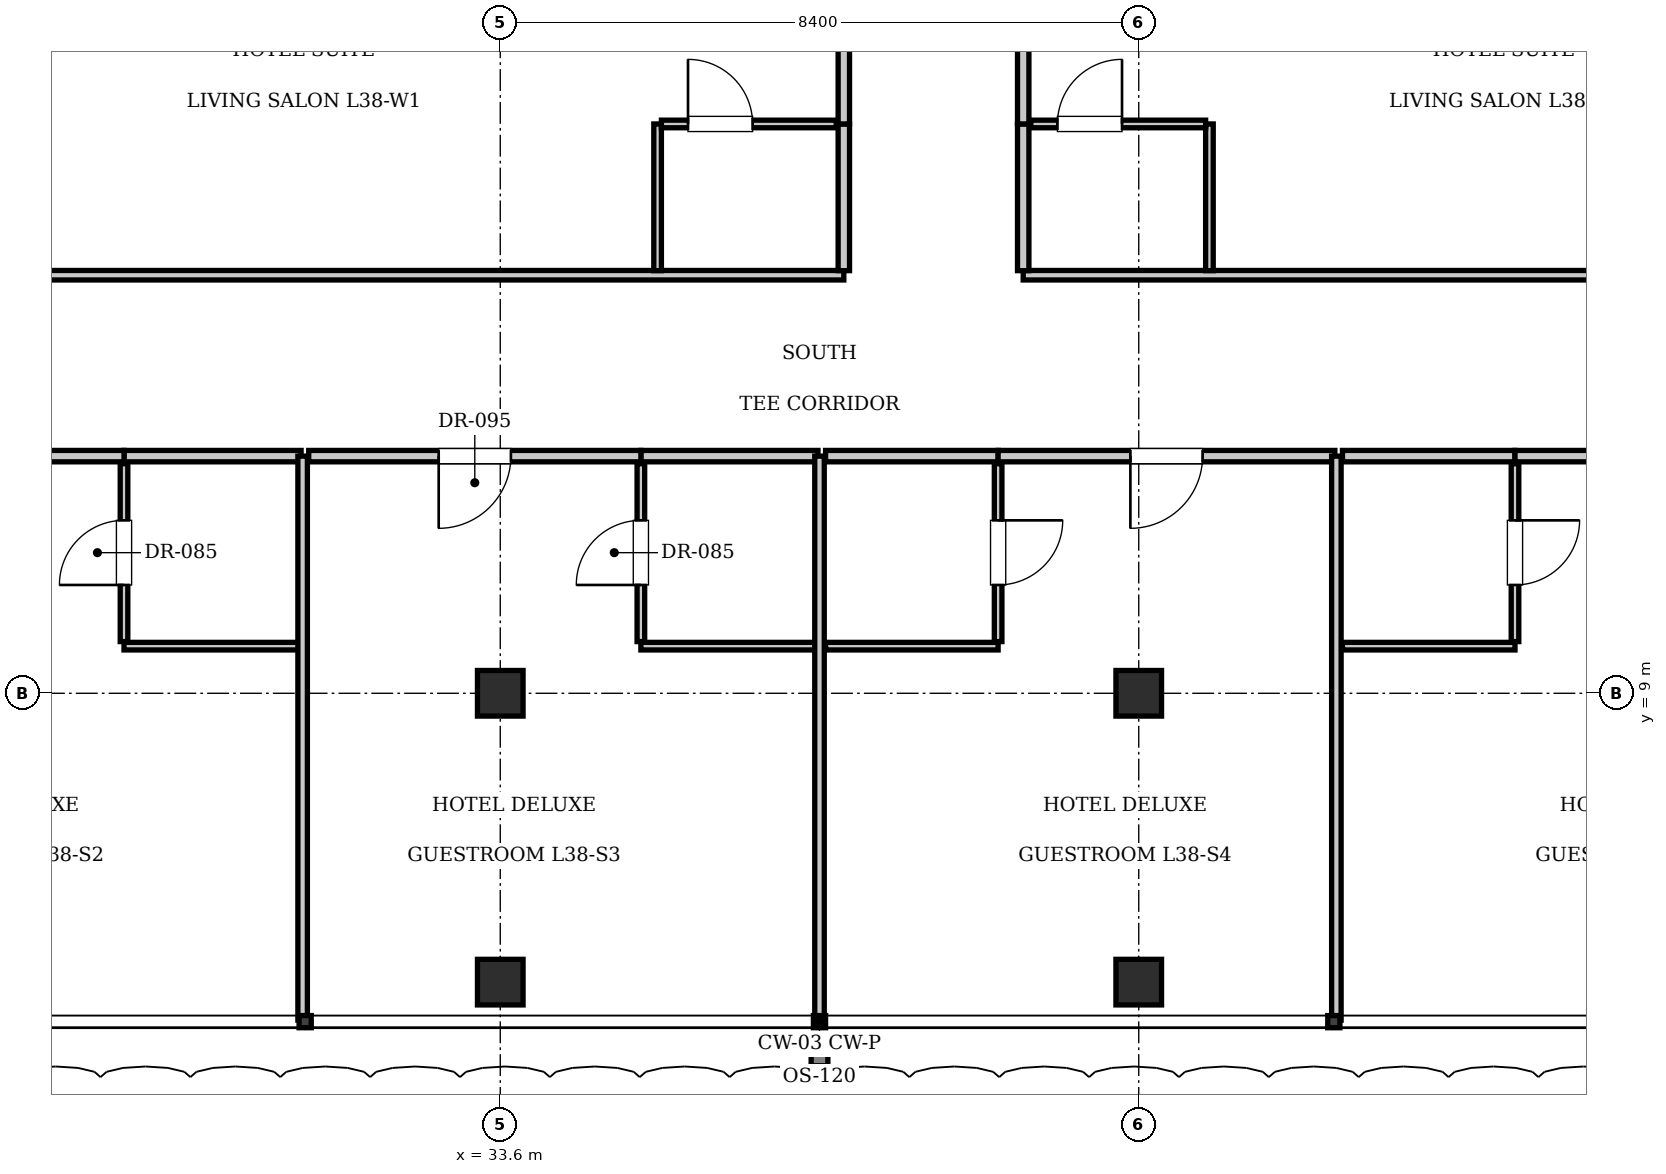
"""IFC4 building model, lengths in metres.
Left out: names, types, materials, properties, quantities, classifications, styles, units other than length and angle.
Written with IfcOpenShell. Run it as: python <this file> out.ifc"""

import sys

from ifc_helpers import new_model, si_unit, direction, frame, frame_2d, origin, origin_2d, place, context, subcontext, project, spatial, rectangle, i_section, extrude, element, fill, save


model = new_model("IFC4")
c1 = context("Model", 3, precision=1e-05, world=origin(), true_north=direction((0.0, 1.0)))
c2 = subcontext(c1, "Body", "Model", "MODEL_VIEW")
j1 = project(units=[si_unit("LENGTHUNIT", "METRE"), si_unit("PLANEANGLEUNIT", "RADIAN")], contexts=[c1])
p1 = place(None, origin())
s1 = spatial("IfcSite", under=j1, at=p1, CompositionType="ELEMENT")
p2 = place(p1, origin())
s2 = spatial("IfcBuilding", under=s1, at=p2, CompositionType="ELEMENT")
p3 = place(p2, frame((0.0, 0.0, 158.2)))
s3 = spatial("IfcBuildingStorey", under=s2, at=p3, CompositionType="ELEMENT", Elevation=158.2)
for number, where, z_axis, x_axis in (
    (1, (33.6, 9.0, 0.0), (0.0, 0.0, 1.0), (1.0, 0.0, 0.0)),
    (2, (42.0, 9.0, 0.0), (0.0, 0.0, 1.0), (1.0, 0.0, 0.0)),
    (3, (33.6, 5.2, 0.0), (0.0, 0.0, 1.0), (1.0, 0.0, 0.0)),
    (4, (42.0, 5.2, 0.0), (0.0, 0.0, 1.0), (1.0, 0.0, 0.0)),
):
    element("IfcColumn", number, at=place(p3, frame(where, z_axis=z_axis, x_axis=x_axis)), inside=s3, PredefinedType="COLUMN", context=c2, shape_type="SweptSolid", body=[
        extrude(i_section(OverallWidth=0.6, OverallDepth=0.6, WebThickness=0.025, FlangeThickness=0.038, at=origin_2d()), origin(), (0.0, 0.0, 1.0), 3.85),
    ])
p4 = place(p3, frame((28.65, 12.12, 0.0), z_axis=(0.0, 0.0, 1.0), x_axis=(1.0, 0.0, 0.0)))
e5 = element("IfcWall", 5, at=p4, inside=s3, PredefinedType="PARTITIONING", context=c2, shape_type="SweptSolid", body=[
    extrude(rectangle(XDim=2.33, YDim=0.15, at=frame_2d((1.165, 0.0))), origin(), (0.0, 0.0, 1.0), 3.61),
])
p5 = place(p3, frame((28.65, 9.62, 0.0), z_axis=(0.0, 0.0, 1.0), x_axis=(1.0, 0.0, 0.0)))
e6 = element("IfcWall", 6, at=p5, inside=s3, PredefinedType="PARTITIONING", context=c2, shape_type="SweptSolid", body=[
    extrude(rectangle(XDim=2.31, YDim=0.1, at=frame_2d((1.155, 0.0))), origin(), (0.0, 0.0, 1.0), 3.61),
])
p6 = place(p3, frame((28.65, 9.68, 0.0), z_axis=(0.0, 0.0, 1.0), x_axis=(0.0, 1.0, 0.0)))
e7 = element("IfcWall", 7, at=p6, inside=s3, PredefinedType="PARTITIONING", context=c2, shape_type="SweptSolid", body=[
    extrude(rectangle(XDim=2.34, YDim=0.1, at=frame_2d((1.17, 0.0))), origin(), (0.0, 0.0, 1.0), 3.61),
])
p7 = place(p6, frame((0.745, 0.0, 0.0)))
e8 = element("IfcOpeningElement", 8, at=p7, cuts=e7, PredefinedType="OPENING", context=c2, shape_type="SweptSolid", body=[
    extrude(rectangle(XDim=0.85, YDim=2.1, at=frame_2d((0.425, 1.05))), frame((0.0, 0.06, 0.0), z_axis=(0.0, -1.0, 0.0), x_axis=(1.0, 0.0, 0.0)), (0.0, 0.0, 1.0), 0.12),
])
p8 = place(p3, frame((24.28, 12.12, 0.0), z_axis=(0.0, 0.0, 1.0), x_axis=(1.0, 0.0, 0.0)))
e9 = element("IfcWall", 9, at=p8, inside=s3, PredefinedType="PARTITIONING", context=c2, shape_type="SweptSolid", body=[
    extrude(rectangle(XDim=4.37, YDim=0.15, at=frame_2d((2.185, 0.0))), origin(), (0.0, 0.0, 1.0), 3.61),
])
p9 = place(p8, frame((1.71, 0.0, 0.0)))
e10 = element("IfcOpeningElement", 10, at=p9, cuts=e9, PredefinedType="OPENING", context=c2, shape_type="SweptSolid", body=[
    extrude(rectangle(XDim=0.95, YDim=2.15, at=frame_2d((0.475, 1.075))), frame((0.0, 0.085, 0.0), z_axis=(0.0, -1.0, 0.0), x_axis=(1.0, 0.0, 0.0)), (0.0, 0.0, 1.0), 0.17),
])
p10 = place(p3, frame((31.0, 4.7, 0.0), z_axis=(0.0, 0.0, 1.0), x_axis=(0.0, 1.0, 0.0)))
e11 = element("IfcWall", 11, at=p10, inside=s3, PredefinedType="PARTITIONING", context=c2, shape_type="SweptSolid", body=[
    extrude(rectangle(XDim=7.42, YDim=0.125, at=frame_2d((3.71, 0.0))), origin(), (0.0, 0.0, 1.0), 3.61),
])
p11 = place(p3, frame((35.45, 12.12, 0.0), z_axis=(0.0, 0.0, 1.0), x_axis=(1.0, 0.0, 0.0)))
e12 = element("IfcWall", 12, at=p11, inside=s3, PredefinedType="PARTITIONING", context=c2, shape_type="SweptSolid", body=[
    extrude(rectangle(XDim=2.33, YDim=0.15, at=frame_2d((1.165, 0.0))), origin(), (0.0, 0.0, 1.0), 3.61),
])
p12 = place(p3, frame((35.45, 9.62, 0.0), z_axis=(0.0, 0.0, 1.0), x_axis=(1.0, 0.0, 0.0)))
e13 = element("IfcWall", 13, at=p12, inside=s3, PredefinedType="PARTITIONING", context=c2, shape_type="SweptSolid", body=[
    extrude(rectangle(XDim=2.31, YDim=0.1, at=frame_2d((1.155, 0.0))), origin(), (0.0, 0.0, 1.0), 3.61),
])
p13 = place(p3, frame((35.45, 9.68, 0.0), z_axis=(0.0, 0.0, 1.0), x_axis=(0.0, 1.0, 0.0)))
e14 = element("IfcWall", 14, at=p13, inside=s3, PredefinedType="PARTITIONING", context=c2, shape_type="SweptSolid", body=[
    extrude(rectangle(XDim=2.34, YDim=0.1, at=frame_2d((1.17, 0.0))), origin(), (0.0, 0.0, 1.0), 3.61),
])
p14 = place(p13, frame((0.745, 0.0, 0.0)))
e15 = element("IfcOpeningElement", 15, at=p14, cuts=e14, PredefinedType="OPENING", context=c2, shape_type="SweptSolid", body=[
    extrude(rectangle(XDim=0.85, YDim=2.1, at=frame_2d((0.425, 1.05))), frame((0.0, 0.06, 0.0), z_axis=(0.0, -1.0, 0.0), x_axis=(1.0, 0.0, 0.0)), (0.0, 0.0, 1.0), 0.12),
])
p15 = place(p3, frame((31.08, 12.12, 0.0), z_axis=(0.0, 0.0, 1.0), x_axis=(1.0, 0.0, 0.0)))
e16 = element("IfcWall", 16, at=p15, inside=s3, PredefinedType="PARTITIONING", context=c2, shape_type="SweptSolid", body=[
    extrude(rectangle(XDim=4.37, YDim=0.15, at=frame_2d((2.185, 0.0))), origin(), (0.0, 0.0, 1.0), 3.61),
])
p16 = place(p15, frame((1.71, 0.0, 0.0)))
e17 = element("IfcOpeningElement", 17, at=p16, cuts=e16, PredefinedType="OPENING", context=c2, shape_type="SweptSolid", body=[
    extrude(rectangle(XDim=0.95, YDim=2.15, at=frame_2d((0.475, 1.075))), frame((0.0, 0.085, 0.0), z_axis=(0.0, -1.0, 0.0), x_axis=(1.0, 0.0, 0.0)), (0.0, 0.0, 1.0), 0.17),
])
p17 = place(p3, frame((37.8, 4.7, 0.0), z_axis=(0.0, 0.0, 1.0), x_axis=(0.0, 1.0, 0.0)))
e18 = element("IfcWall", 18, at=p17, inside=s3, PredefinedType="PARTITIONING", context=c2, shape_type="SweptSolid", body=[
    extrude(rectangle(XDim=7.42, YDim=0.125, at=frame_2d((3.71, 0.0))), origin(), (0.0, 0.0, 1.0), 3.344),
])
p18 = place(p3, frame((37.88, 12.12, 0.0), z_axis=(0.0, 0.0, 1.0), x_axis=(1.0, 0.0, 0.0)))
e19 = element("IfcWall", 19, at=p18, inside=s3, PredefinedType="PARTITIONING", context=c2, shape_type="SweptSolid", body=[
    extrude(rectangle(XDim=2.27, YDim=0.15, at=frame_2d((1.135, 0.0))), origin(), (0.0, 0.0, 1.0), 3.61),
])
p19 = place(p3, frame((37.88, 9.62, 0.0), z_axis=(0.0, 0.0, 1.0), x_axis=(1.0, 0.0, 0.0)))
e20 = element("IfcWall", 20, at=p19, inside=s3, PredefinedType="PARTITIONING", context=c2, shape_type="SweptSolid", body=[
    extrude(rectangle(XDim=2.27, YDim=0.1, at=frame_2d((1.135, 0.0))), origin(), (0.0, 0.0, 1.0), 3.61),
])
p20 = place(p3, frame((40.15, 9.68, 0.0), z_axis=(0.0, 0.0, 1.0), x_axis=(0.0, 1.0, 0.0)))
e21 = element("IfcWall", 21, at=p20, inside=s3, PredefinedType="PARTITIONING", context=c2, shape_type="SweptSolid", body=[
    extrude(rectangle(XDim=2.34, YDim=0.1, at=frame_2d((1.17, 0.0))), origin(), (0.0, 0.0, 1.0), 3.61),
])
p21 = place(p20, frame((0.745, 0.0, 0.0)))
e22 = element("IfcOpeningElement", 22, at=p21, cuts=e21, PredefinedType="OPENING", context=c2, shape_type="SweptSolid", body=[
    extrude(rectangle(XDim=0.85, YDim=2.1, at=frame_2d((0.425, 1.05))), frame((0.0, 0.06, 0.0), z_axis=(0.0, -1.0, 0.0), x_axis=(1.0, 0.0, 0.0)), (0.0, 0.0, 1.0), 0.12),
])
p22 = place(p3, frame((40.15, 12.12, 0.0), z_axis=(0.0, 0.0, 1.0), x_axis=(1.0, 0.0, 0.0)))
e23 = element("IfcWall", 23, at=p22, inside=s3, PredefinedType="PARTITIONING", context=c2, shape_type="SweptSolid", body=[
    extrude(rectangle(XDim=4.43, YDim=0.15, at=frame_2d((2.215, 0.0))), origin(), (0.0, 0.0, 1.0), 3.61),
])
p23 = place(p22, frame((1.74, 0.0, 0.0)))
e24 = element("IfcOpeningElement", 24, at=p23, cuts=e23, PredefinedType="OPENING", context=c2, shape_type="SweptSolid", body=[
    extrude(rectangle(XDim=0.95, YDim=2.15, at=frame_2d((0.475, 1.075))), frame((0.0, 0.085, 0.0), z_axis=(0.0, -1.0, 0.0), x_axis=(1.0, 0.0, 0.0)), (0.0, 0.0, 1.0), 0.17),
])
p24 = place(p3, frame((44.6, 4.7, 0.0), z_axis=(0.0, 0.0, 1.0), x_axis=(0.0, 1.0, 0.0)))
e25 = element("IfcWall", 25, at=p24, inside=s3, PredefinedType="PARTITIONING", context=c2, shape_type="SweptSolid", body=[
    extrude(rectangle(XDim=7.42, YDim=0.125, at=frame_2d((3.71, 0.0))), origin(), (0.0, 0.0, 1.0), 3.61),
])
p25 = place(p3, frame((44.68, 12.12, 0.0), z_axis=(0.0, 0.0, 1.0), x_axis=(1.0, 0.0, 0.0)))
e26 = element("IfcWall", 26, at=p25, inside=s3, PredefinedType="PARTITIONING", context=c2, shape_type="SweptSolid", body=[
    extrude(rectangle(XDim=2.27, YDim=0.15, at=frame_2d((1.135, 0.0))), origin(), (0.0, 0.0, 1.0), 3.61),
])
p26 = place(p3, frame((44.68, 9.62, 0.0), z_axis=(0.0, 0.0, 1.0), x_axis=(1.0, 0.0, 0.0)))
e27 = element("IfcWall", 27, at=p26, inside=s3, PredefinedType="PARTITIONING", context=c2, shape_type="SweptSolid", body=[
    extrude(rectangle(XDim=2.27, YDim=0.1, at=frame_2d((1.135, 0.0))), origin(), (0.0, 0.0, 1.0), 3.61),
])
p27 = place(p3, frame((46.95, 9.68, 0.0), z_axis=(0.0, 0.0, 1.0), x_axis=(0.0, 1.0, 0.0)))
e28 = element("IfcWall", 28, at=p27, inside=s3, PredefinedType="PARTITIONING", context=c2, shape_type="SweptSolid", body=[
    extrude(rectangle(XDim=2.34, YDim=0.1, at=frame_2d((1.17, 0.0))), origin(), (0.0, 0.0, 1.0), 3.61),
])
p28 = place(p27, frame((0.745, 0.0, 0.0)))
e29 = element("IfcOpeningElement", 29, at=p28, cuts=e28, PredefinedType="OPENING", context=c2, shape_type="SweptSolid", body=[
    extrude(rectangle(XDim=0.85, YDim=2.1, at=frame_2d((0.425, 1.05))), frame((0.0, 0.06, 0.0), z_axis=(0.0, -1.0, 0.0), x_axis=(1.0, 0.0, 0.0)), (0.0, 0.0, 1.0), 0.12),
])
p29 = place(p3, frame((46.95, 12.12, 0.0), z_axis=(0.0, 0.0, 1.0), x_axis=(1.0, 0.0, 0.0)))
e30 = element("IfcWall", 30, at=p29, inside=s3, PredefinedType="PARTITIONING", context=c2, shape_type="SweptSolid", body=[
    extrude(rectangle(XDim=4.43, YDim=0.15, at=frame_2d((2.215, 0.0))), origin(), (0.0, 0.0, 1.0), 3.61),
])
p30 = place(p29, frame((1.74, 0.0, 0.0)))
e31 = element("IfcOpeningElement", 31, at=p30, cuts=e30, PredefinedType="OPENING", context=c2, shape_type="SweptSolid", body=[
    extrude(rectangle(XDim=0.95, YDim=2.15, at=frame_2d((0.475, 1.075))), frame((0.0, 0.085, 0.0), z_axis=(0.0, -1.0, 0.0), x_axis=(1.0, 0.0, 0.0)), (0.0, 0.0, 1.0), 0.17),
])
p31 = place(p3, frame((13.2, 14.5, 0.0), z_axis=(0.0, 0.0, 1.0), x_axis=(1.0, 0.0, 0.0)))
e32 = element("IfcWall", 32, at=p31, inside=s3, PredefinedType="PARTITIONING", context=c2, shape_type="SweptSolid", body=[
    extrude(rectangle(XDim=24.92, YDim=0.125, at=frame_2d((12.46, 0.0))), origin(), (0.0, 0.0, 1.0), 3.61),
])
p32 = place(p3, frame((40.48, 14.5, 0.0), z_axis=(0.0, 0.0, 1.0), x_axis=(1.0, 0.0, 0.0)))
e33 = element("IfcWall", 33, at=p32, inside=s3, PredefinedType="PARTITIONING", context=c2, shape_type="SweptSolid", body=[
    extrude(rectangle(XDim=21.92, YDim=0.125, at=frame_2d((10.96, 0.0))), origin(), (0.0, 0.0, 1.0), 3.61),
])
p33 = place(p3, frame((38.12, 14.56, 0.0), z_axis=(0.0, 0.0, 1.0), x_axis=(0.0, 1.0, 0.0)))
e34 = element("IfcWall", 34, at=p33, inside=s3, PredefinedType="PARTITIONING", context=c2, shape_type="SweptSolid", body=[
    extrude(rectangle(XDim=1.93, YDim=0.15, at=frame_2d((0.965, 0.0))), origin(), (0.0, 0.0, 1.0), 3.61),
])
p34 = place(p3, frame((38.12, 16.49, 0.0), z_axis=(0.0, 0.0, 1.0), x_axis=(0.0, 1.0, 0.0)))
e35 = element("IfcWall", 35, at=p34, inside=s3, PredefinedType="PARTITIONING", context=c2, shape_type="SweptSolid", body=[
    extrude(rectangle(XDim=3.48, YDim=0.15, at=frame_2d((1.74, 0.0))), origin(), (0.0, 0.0, 1.0), 3.61),
])
p35 = place(p34, frame((1.265, 0.0, 0.0)))
e36 = element("IfcOpeningElement", 36, at=p35, cuts=e35, PredefinedType="OPENING", context=c2, shape_type="SweptSolid", body=[
    extrude(rectangle(XDim=0.95, YDim=2.15, at=frame_2d((0.475, 1.075))), frame((0.0, 0.085, 0.0), z_axis=(0.0, -1.0, 0.0), x_axis=(1.0, 0.0, 0.0)), (0.0, 0.0, 1.0), 0.17),
])
p36 = place(p3, frame((35.67, 14.56, 0.0), z_axis=(0.0, 0.0, 1.0), x_axis=(0.0, 1.0, 0.0)))
e37 = element("IfcWall", 37, at=p36, inside=s3, PredefinedType="PARTITIONING", context=c2, shape_type="SweptSolid", body=[
    extrude(rectangle(XDim=1.93, YDim=0.1, at=frame_2d((0.965, 0.0))), origin(), (0.0, 0.0, 1.0), 3.61),
])
p37 = place(p3, frame((35.72, 16.49, 0.0), z_axis=(0.0, 0.0, 1.0), x_axis=(1.0, 0.0, 0.0)))
e38 = element("IfcWall", 38, at=p37, inside=s3, PredefinedType="PARTITIONING", context=c2, shape_type="SweptSolid", body=[
    extrude(rectangle(XDim=2.3, YDim=0.1, at=frame_2d((1.15, 0.0))), origin(), (0.0, 0.0, 1.0), 3.61),
])
p38 = place(p37, frame((0.35, 0.0, 0.0)))
e39 = element("IfcOpeningElement", 39, at=p38, cuts=e38, PredefinedType="OPENING", context=c2, shape_type="SweptSolid", body=[
    extrude(rectangle(XDim=0.85, YDim=2.1, at=frame_2d((0.425, 1.05))), frame((0.0, 0.06, 0.0), z_axis=(0.0, -1.0, 0.0), x_axis=(1.0, 0.0, 0.0)), (0.0, 0.0, 1.0), 0.12),
])
p39 = place(p3, frame((40.48, 14.56, 0.0), z_axis=(0.0, 0.0, 1.0), x_axis=(0.0, 1.0, 0.0)))
e40 = element("IfcWall", 40, at=p39, inside=s3, PredefinedType="PARTITIONING", context=c2, shape_type="SweptSolid", body=[
    extrude(rectangle(XDim=1.93, YDim=0.15, at=frame_2d((0.965, 0.0))), origin(), (0.0, 0.0, 1.0), 3.61),
])
p40 = place(p3, frame((40.48, 16.49, 0.0), z_axis=(0.0, 0.0, 1.0), x_axis=(0.0, 1.0, 0.0)))
e41 = element("IfcWall", 41, at=p40, inside=s3, PredefinedType="PARTITIONING", context=c2, shape_type="SweptSolid", body=[
    extrude(rectangle(XDim=3.48, YDim=0.15, at=frame_2d((1.74, 0.0))), origin(), (0.0, 0.0, 1.0), 3.61),
])
p41 = place(p40, frame((2.225, 0.0, 0.0)))
e42 = element("IfcOpeningElement", 42, at=p41, cuts=e41, PredefinedType="OPENING", context=c2, shape_type="SweptSolid", body=[
    extrude(rectangle(XDim=0.95, YDim=2.15, at=frame_2d((0.475, 1.075))), frame((0.0, 0.085, 0.0), z_axis=(0.0, -1.0, 0.0), x_axis=(1.0, 0.0, 0.0)), (0.0, 0.0, 1.0), 0.17),
])
p42 = place(p3, frame((42.93, 14.56, 0.0), z_axis=(0.0, 0.0, 1.0), x_axis=(0.0, 1.0, 0.0)))
e43 = element("IfcWall", 43, at=p42, inside=s3, PredefinedType="PARTITIONING", context=c2, shape_type="SweptSolid", body=[
    extrude(rectangle(XDim=1.93, YDim=0.1, at=frame_2d((0.965, 0.0))), origin(), (0.0, 0.0, 1.0), 3.61),
])
p43 = place(p3, frame((40.58, 16.49, 0.0), z_axis=(0.0, 0.0, 1.0), x_axis=(1.0, 0.0, 0.0)))
e44 = element("IfcWall", 44, at=p43, inside=s3, PredefinedType="PARTITIONING", context=c2, shape_type="SweptSolid", body=[
    extrude(rectangle(XDim=2.3, YDim=0.1, at=frame_2d((1.15, 0.0))), origin(), (0.0, 0.0, 1.0), 3.61),
])
p44 = place(p43, frame((0.35, 0.0, 0.0)))
e45 = element("IfcOpeningElement", 45, at=p44, cuts=e44, PredefinedType="OPENING", context=c2, shape_type="SweptSolid", body=[
    extrude(rectangle(XDim=0.85, YDim=2.1, at=frame_2d((0.425, 1.05))), frame((0.0, 0.06, 0.0), z_axis=(0.0, -1.0, 0.0), x_axis=(1.0, 0.0, 0.0)), (0.0, 0.0, 1.0), 0.12),
])
p45 = place(p7, origin())
e46 = element("IfcDoor", 46, at=p45, inside=s3, OperationType="SINGLE_SWING_LEFT", PredefinedType="DOOR", context=c2, shape_type="SweptSolid", body=[
    extrude(rectangle(XDim=0.85, YDim=2.1, at=frame_2d((0.425, 1.05))), frame((0.0, 0.025, 0.0), z_axis=(0.0, -1.0, 0.0), x_axis=(1.0, 0.0, 0.0)), (0.0, 0.0, 1.0), 0.05),
])
fill(e8, e46)
p46 = place(p14, origin())
e47 = element("IfcDoor", 47, at=p46, inside=s3, OperationType="SINGLE_SWING_LEFT", PredefinedType="DOOR", context=c2, shape_type="SweptSolid", body=[
    extrude(rectangle(XDim=0.85, YDim=2.1, at=frame_2d((0.425, 1.05))), frame((0.0, 0.025, 0.0), z_axis=(0.0, -1.0, 0.0), x_axis=(1.0, 0.0, 0.0)), (0.0, 0.0, 1.0), 0.05),
])
fill(e15, e47)
p47 = place(p16, frame((0.95, 0.0, 0.0), z_axis=(0.0, 0.0, 1.0), x_axis=(-1.0, 0.0, 0.0)))
e48 = element("IfcDoor", 48, at=p47, inside=s3, OperationType="SINGLE_SWING_RIGHT", PredefinedType="DOOR", context=c2, shape_type="SweptSolid", body=[
    extrude(rectangle(XDim=0.95, YDim=2.15, at=frame_2d((0.475, 1.075))), frame((0.0, 0.025, 0.0), z_axis=(0.0, -1.0, 0.0), x_axis=(1.0, 0.0, 0.0)), (0.0, 0.0, 1.0), 0.05),
])
fill(e17, e48)
p48 = place(p21, frame((0.85, 0.0, 0.0), z_axis=(0.0, 0.0, 1.0), x_axis=(-1.0, 0.0, 0.0)))
e49 = element("IfcDoor", 49, at=p48, inside=s3, OperationType="SINGLE_SWING_LEFT", PredefinedType="DOOR", context=c2, shape_type="SweptSolid", body=[
    extrude(rectangle(XDim=0.85, YDim=2.1, at=frame_2d((0.425, 1.05))), frame((0.0, 0.025, 0.0), z_axis=(0.0, -1.0, 0.0), x_axis=(1.0, 0.0, 0.0)), (0.0, 0.0, 1.0), 0.05),
])
fill(e22, e49)
p49 = place(p23, frame((0.95, 0.0, 0.0), z_axis=(0.0, 0.0, 1.0), x_axis=(-1.0, 0.0, 0.0)))
e50 = element("IfcDoor", 50, at=p49, inside=s3, OperationType="SINGLE_SWING_RIGHT", PredefinedType="DOOR", context=c2, shape_type="SweptSolid", body=[
    extrude(rectangle(XDim=0.95, YDim=2.15, at=frame_2d((0.475, 1.075))), frame((0.0, 0.025, 0.0), z_axis=(0.0, -1.0, 0.0), x_axis=(1.0, 0.0, 0.0)), (0.0, 0.0, 1.0), 0.05),
])
fill(e24, e50)
p50 = place(p28, frame((0.85, 0.0, 0.0), z_axis=(0.0, 0.0, 1.0), x_axis=(-1.0, 0.0, 0.0)))
e51 = element("IfcDoor", 51, at=p50, inside=s3, OperationType="SINGLE_SWING_LEFT", PredefinedType="DOOR", context=c2, shape_type="SweptSolid", body=[
    extrude(rectangle(XDim=0.85, YDim=2.1, at=frame_2d((0.425, 1.05))), frame((0.0, 0.025, 0.0), z_axis=(0.0, -1.0, 0.0), x_axis=(1.0, 0.0, 0.0)), (0.0, 0.0, 1.0), 0.05),
])
fill(e29, e51)
p51 = place(p38, origin())
e52 = element("IfcDoor", 52, at=p51, inside=s3, OperationType="SINGLE_SWING_LEFT", PredefinedType="DOOR", context=c2, shape_type="SweptSolid", body=[
    extrude(rectangle(XDim=0.85, YDim=2.1, at=frame_2d((0.425, 1.05))), frame((0.0, 0.025, 0.0), z_axis=(0.0, -1.0, 0.0), x_axis=(1.0, 0.0, 0.0)), (0.0, 0.0, 1.0), 0.05),
])
fill(e39, e52)
p52 = place(p44, origin())
e53 = element("IfcDoor", 53, at=p52, inside=s3, OperationType="SINGLE_SWING_RIGHT", PredefinedType="DOOR", context=c2, shape_type="SweptSolid", body=[
    extrude(rectangle(XDim=0.85, YDim=2.1, at=frame_2d((0.425, 1.05))), frame((0.0, 0.025, 0.0), z_axis=(0.0, -1.0, 0.0), x_axis=(1.0, 0.0, 0.0)), (0.0, 0.0, 1.0), 0.05),
])
fill(e45, e53)
save(model, sys.argv[1])
